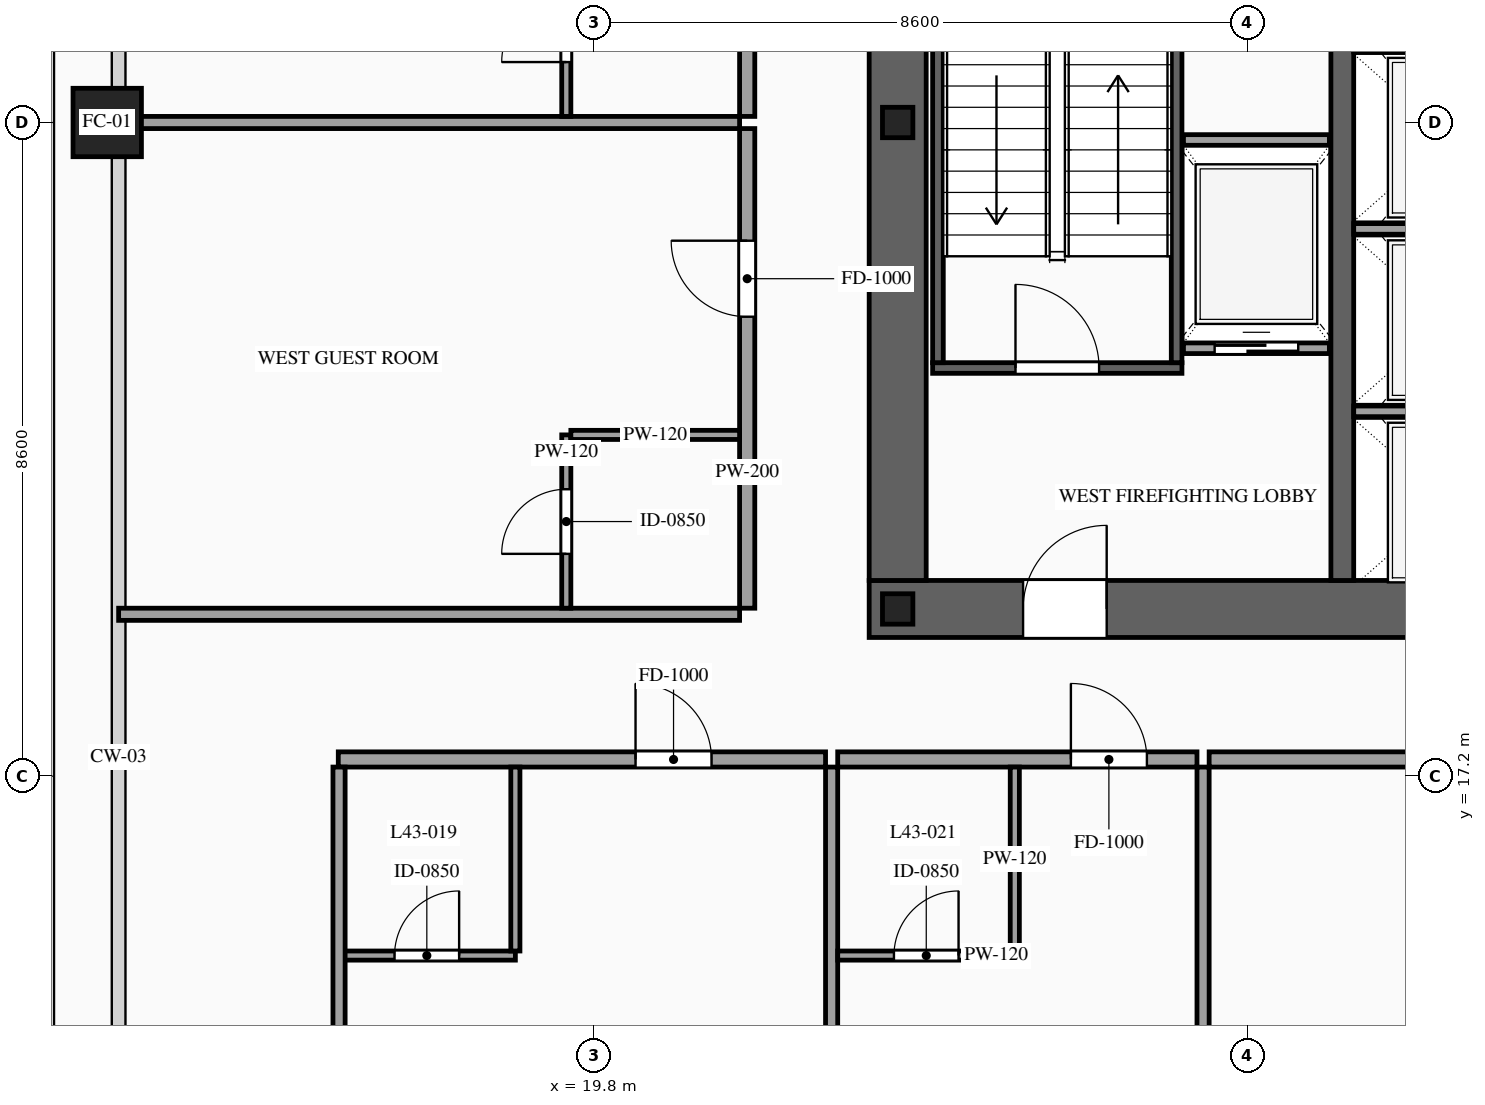
"""IFC4 building model, lengths in metres.
Left out: names, types, materials, properties, quantities, classifications, styles, units other than length and angle.
Written with IfcOpenShell. Run it as: python <this file> out.ifc"""

import sys

from ifc_helpers import new_model, si_unit, direction, frame, frame_2d, origin, origin_2d, place, context, subcontext, project, spatial, rectangle, hollow_rectangle, i_section, extrude, source, transform, mapped, element, fill, save


model = new_model("IFC4")
c1 = context("Model", 3, precision=1e-05, world=origin(), true_north=direction((0.0, 1.0)))
c2 = subcontext(c1, "Body", "Model", "MODEL_VIEW")
j1 = project(units=[si_unit("LENGTHUNIT", "METRE"), si_unit("PLANEANGLEUNIT", "RADIAN")], contexts=[c1])
p1 = place(None, origin())
s1 = spatial("IfcSite", under=j1, at=p1, CompositionType="ELEMENT")
p2 = place(p1, origin())
s2 = spatial("IfcBuilding", under=s1, at=p2, CompositionType="ELEMENT")
p3 = place(p2, frame((0.0, 0.0, 163.2)))
s3 = spatial("IfcBuildingStorey", under=s2, at=p3, CompositionType="ELEMENT", Elevation=163.2)
p4 = place(p3, frame((23.425, 19.4, 0.0), z_axis=(0.0, 0.0, 1.0), x_axis=(1.0, 0.0, 0.0)))
e1 = element("IfcWall", 1, at=p4, inside=s3, PredefinedType="SHEAR", context=c2, shape_type="SweptSolid", body=[
    extrude(rectangle(XDim=27.15, YDim=0.75, at=frame_2d((13.575, 0.0))), origin(), (0.0, 0.0, 1.0), 3.6),
])
p5 = place(p4, frame((2.025, 0.0, 0.0)))
e2 = element("IfcOpeningElement", 2, at=p5, cuts=e1, PredefinedType="OPENING", context=c2, shape_type="SweptSolid", body=[
    extrude(rectangle(XDim=1.1, YDim=2.2, at=frame_2d((0.55, 1.1))), frame((0.0, 0.39, 0.0), z_axis=(0.0, -1.0, 0.0), x_axis=(1.0, 0.0, 0.0)), (0.0, 0.0, 1.0), 0.78),
])
p6 = place(p4, frame((9.925, 0.0, 0.0)))
e3 = element("IfcOpeningElement", 3, at=p6, cuts=e1, PredefinedType="OPENING", context=c2, shape_type="SweptSolid", body=[
    extrude(rectangle(XDim=1.1, YDim=2.2, at=frame_2d((0.55, 1.1))), frame((0.0, 0.39, 0.0), z_axis=(0.0, -1.0, 0.0), x_axis=(1.0, 0.0, 0.0)), (0.0, 0.0, 1.0), 0.78),
])
p7 = place(p4, frame((23.125, 0.0, 0.0)))
e4 = element("IfcOpeningElement", 4, at=p7, cuts=e1, PredefinedType="OPENING", context=c2, shape_type="SweptSolid", body=[
    extrude(rectangle(XDim=1.1, YDim=2.2, at=frame_2d((0.55, 1.1))), frame((0.0, 0.39, 0.0), z_axis=(0.0, -1.0, 0.0), x_axis=(1.0, 0.0, 0.0)), (0.0, 0.0, 1.0), 0.78),
])
p8 = place(p4, frame((19.745, 0.0, 0.0)))
e5 = element("IfcOpeningElement", 5, at=p8, cuts=e1, PredefinedType="OPENING", context=c2, shape_type="SweptSolid", body=[
    extrude(rectangle(XDim=0.9, YDim=2.15, at=frame_2d((0.45, 1.075))), frame((0.0, 0.39, 0.0), z_axis=(0.0, -1.0, 0.0), x_axis=(1.0, 0.0, 0.0)), (0.0, 0.0, 1.0), 0.78),
])
p9 = place(p4, frame((18.305, 0.0, 0.0)))
e6 = element("IfcOpeningElement", 6, at=p9, cuts=e1, PredefinedType="OPENING", context=c2, shape_type="SweptSolid", body=[
    extrude(rectangle(XDim=0.9, YDim=2.15, at=frame_2d((0.45, 1.075))), frame((0.0, 0.39, 0.0), z_axis=(0.0, -1.0, 0.0), x_axis=(1.0, 0.0, 0.0)), (0.0, 0.0, 1.0), 0.78),
])
m1 = source(origin(), c2, "Body", "SweptSolid", [
    extrude(rectangle(XDim=12.05, YDim=0.75, at=frame_2d((6.025, 0.0))), origin(), (0.0, 0.0, 1.0), 3.6),
])
p10 = place(p3, frame((23.8, 19.775, 0.0), z_axis=(0.0, 0.0, 1.0), x_axis=(0.0, 1.0, 0.0)))
e7 = element("IfcWall", 7, at=p10, inside=s3, PredefinedType="SHEAR", context=c2, shape_type="MappedRepresentation", body=[
    mapped(m1, transform((0.0, 0.0, 0.0), scale=1.0)),
])
m2 = source(origin(), c2, "Body", "SweptSolid", [
    extrude(rectangle(XDim=12.05, YDim=0.3, at=frame_2d((6.025, 0.0))), origin(), (0.0, 0.0, 1.0), 3.6),
])
p11 = place(p3, frame((29.65, 19.775, 0.0), z_axis=(0.0, 0.0, 1.0), x_axis=(0.0, 1.0, 0.0)))
e8 = element("IfcWall", 8, at=p11, inside=s3, PredefinedType="SOLIDWALL", context=c2, shape_type="MappedRepresentation", body=[
    mapped(m2, transform((0.0, 0.0, 0.0), scale=1.0)),
])
m3 = source(origin(), c2, "Body", "SweptSolid", [
    extrude(i_section(OverallWidth=0.4, OverallDepth=0.4, WebThickness=0.013, FlangeThickness=0.021, at=origin_2d()), origin(), (0.0, 0.0, 1.0), 3.6),
])
for number, where, z_axis, x_axis in (
    (9, (23.8, 19.4, 0.0), (0.0, 0.0, 1.0), (1.0, 0.0, 0.0)),
    (10, (23.8, 25.8, 0.0), (0.0, 0.0, 1.0), (1.0, 0.0, 0.0)),
):
    element("IfcColumn", number, at=place(p3, frame(where, z_axis=z_axis, x_axis=x_axis)), inside=s3, PredefinedType="COLUMN", context=c2, shape_type="MappedRepresentation", body=[
        mapped(m3, transform((0.0, 0.0, 0.0), scale=1.0)),
    ])
m4 = source(origin(), c2, "Body", "SweptSolid", [
    extrude(hollow_rectangle(XDim=0.9, YDim=0.9, WallThickness=0.042, at=origin_2d()), origin(), (0.0, 0.0, 1.0), 3.3),
])
p12 = place(p3, frame((13.4, 25.8, 0.0), z_axis=(0.0, 0.0, 1.0), x_axis=(1.0, 0.0, 0.0)))
e11 = element("IfcColumn", 11, at=p12, inside=s3, PredefinedType="COLUMN", context=c2, shape_type="MappedRepresentation", body=[
    mapped(m4, transform((0.0, 0.0, 0.0), scale=1.0)),
])
p13 = place(p3, frame((27.56, 22.83, 0.0), z_axis=(0.0, 0.0, 1.0), x_axis=(1.0, 0.0, 0.0)))
e12 = element("IfcWall", 12, at=p13, inside=s3, PredefinedType="SOLIDWALL", context=c2, shape_type="SweptSolid", body=[
    extrude(rectangle(XDim=1.92, YDim=0.14, at=frame_2d((0.96, 0.0))), origin(), (0.0, 0.0, 1.0), 3.3),
])
p14 = place(p13, frame((0.41, 0.0, 0.0)))
e13 = element("IfcOpeningElement", 13, at=p14, cuts=e12, PredefinedType="OPENING", context=c2, shape_type="SweptSolid", body=[
    extrude(rectangle(XDim=1.1, YDim=2.2, at=frame_2d((0.55, 1.1))), frame((0.0, 0.085, 0.0), z_axis=(0.0, -1.0, 0.0), x_axis=(1.0, 0.0, 0.0)), (0.0, 0.0, 1.0), 0.17),
])
m5 = source(origin(), c2, "Body", "SweptSolid", [
    extrude(rectangle(XDim=1.92, YDim=0.14, at=frame_2d((0.96, 0.0))), origin(), (0.0, 0.0, 1.0), 3.3),
])
p15 = place(p3, frame((27.56, 25.57, 0.0), z_axis=(0.0, 0.0, 1.0), x_axis=(1.0, 0.0, 0.0)))
e14 = element("IfcWall", 14, at=p15, inside=s3, PredefinedType="SOLIDWALL", context=c2, shape_type="MappedRepresentation", body=[
    mapped(m5, transform((0.0, 0.0, 0.0), scale=1.0)),
])
m6 = source(origin(), c2, "Body", "SweptSolid", [
    extrude(rectangle(XDim=2.5, YDim=0.14, at=frame_2d((1.25, 0.0))), origin(), (0.0, 0.0, 1.0), 3.3),
])
for number, where, z_axis, x_axis in (
    (15, (29.8, 22.0, 0.0), (0.0, 0.0, 1.0), (1.0, 0.0, 0.0)),
    (16, (29.8, 24.4, 0.0), (0.0, 0.0, 1.0), (1.0, 0.0, 0.0)),
):
    element("IfcWall", number, at=place(p3, frame(where, z_axis=z_axis, x_axis=x_axis)), inside=s3, PredefinedType="SOLIDWALL", context=c2, shape_type="MappedRepresentation", body=[
        mapped(m6, transform((0.0, 0.0, 0.0), scale=1.0)),
    ])
p16 = place(p3, frame((24.26, 22.57, 0.0), z_axis=(0.0, 0.0, 1.0), x_axis=(1.0, 0.0, 0.0)))
e17 = element("IfcWall", 17, at=p16, inside=s3, PredefinedType="SOLIDWALL", context=c2, shape_type="SweptSolid", body=[
    extrude(rectangle(XDim=3.28, YDim=0.14, at=frame_2d((1.64, 0.0))), origin(), (0.0, 0.0, 1.0), 3.3),
])
p17 = place(p16, frame((1.09, 0.0, 0.0)))
e18 = element("IfcOpeningElement", 18, at=p17, cuts=e17, PredefinedType="OPENING", context=c2, shape_type="SweptSolid", body=[
    extrude(rectangle(XDim=1.1, YDim=2.2, at=frame_2d((0.55, 1.1))), frame((0.0, 0.085, 0.0), z_axis=(0.0, -1.0, 0.0), x_axis=(1.0, 0.0, 0.0)), (0.0, 0.0, 1.0), 0.17),
])
m7 = source(origin(), c2, "Body", "SweptSolid", [
    extrude(rectangle(XDim=8.94, YDim=0.14, at=frame_2d((4.47, 0.0))), origin(), (0.0, 0.0, 1.0), 3.3),
])
for number, where, z_axis, x_axis in (
    (19, (24.33, 22.64, 0.0), (0.0, 0.0, 1.0), (0.0, 1.0, 0.0)),
    (20, (27.47, 22.64, 0.0), (0.0, 0.0, 1.0), (0.0, 1.0, 0.0)),
):
    element("IfcWall", number, at=place(p3, frame(where, z_axis=z_axis, x_axis=x_axis)), inside=s3, PredefinedType="SOLIDWALL", context=c2, shape_type="MappedRepresentation", body=[
        mapped(m7, transform((0.0, 0.0, 0.0), scale=1.0)),
    ])
p18 = place(p3, frame((16.44, 17.42, 0.0), z_axis=(0.0, 0.0, 1.0), x_axis=(1.0, 0.0, 0.0)))
e21 = element("IfcWall", 21, at=p18, inside=s3, PredefinedType="PARTITIONING", context=c2, shape_type="SweptSolid", body=[
    extrude(rectangle(XDim=6.411, YDim=0.2, at=frame_2d((3.206, 0.0))), origin(), (0.0, 0.0, 1.0), 3.05),
])
p19 = place(p18, frame((3.911, 0.0, 0.0)))
e22 = element("IfcOpeningElement", 22, at=p19, cuts=e21, PredefinedType="OPENING", context=c2, shape_type="SweptSolid", body=[
    extrude(rectangle(XDim=1.0, YDim=2.2, at=frame_2d((0.5, 1.1))), frame((0.0, 0.115, 0.0), z_axis=(0.0, -1.0, 0.0), x_axis=(1.0, 0.0, 0.0)), (0.0, 0.0, 1.0), 0.23),
])
m8 = source(origin(), c2, "Body", "SweptSolid", [
    extrude(rectangle(XDim=14.97, YDim=0.16, at=frame_2d((7.485, 0.0))), origin(), (0.0, 0.0, 1.0), 3.05),
])
p20 = place(p3, frame((22.931, 2.35, 0.0), z_axis=(0.0, 0.0, 1.0), x_axis=(0.0, 1.0, 0.0)))
e23 = element("IfcWall", 23, at=p20, inside=s3, PredefinedType="PARTITIONING", context=c2, shape_type="MappedRepresentation", body=[
    mapped(m8, transform((0.0, 0.0, 0.0), scale=1.0)),
])
p21 = place(p3, frame((16.44, 14.84, 0.0), z_axis=(0.0, 0.0, 1.0), x_axis=(1.0, 0.0, 0.0)))
e24 = element("IfcWall", 24, at=p21, inside=s3, PredefinedType="PARTITIONING", context=c2, shape_type="SweptSolid", body=[
    extrude(rectangle(XDim=2.33, YDim=0.12, at=frame_2d((1.165, 0.0))), origin(), (0.0, 0.0, 1.0), 3.05),
])
p22 = place(p21, frame((0.74, 0.0, 0.0)))
e25 = element("IfcOpeningElement", 25, at=p22, cuts=e24, PredefinedType="OPENING", context=c2, shape_type="SweptSolid", body=[
    extrude(rectangle(XDim=0.85, YDim=2.1, at=frame_2d((0.425, 1.05))), frame((0.0, 0.075, 0.0), z_axis=(0.0, -1.0, 0.0), x_axis=(1.0, 0.0, 0.0)), (0.0, 0.0, 1.0), 0.15),
])
m9 = source(origin(), c2, "Body", "SweptSolid", [
    extrude(rectangle(XDim=2.42, YDim=0.12, at=frame_2d((1.21, 0.0))), origin(), (0.0, 0.0, 1.0), 3.05),
])
p23 = place(p3, frame((18.77, 14.9, 0.0), z_axis=(0.0, 0.0, 1.0), x_axis=(0.0, 1.0, 0.0)))
e26 = element("IfcWall", 26, at=p23, inside=s3, PredefinedType="PARTITIONING", context=c2, shape_type="MappedRepresentation", body=[
    mapped(m9, transform((0.0, 0.0, 0.0), scale=1.0)),
])
p24 = place(p3, frame((23.011, 17.42, 0.0), z_axis=(0.0, 0.0, 1.0), x_axis=(1.0, 0.0, 0.0)))
e27 = element("IfcWall", 27, at=p24, inside=s3, PredefinedType="PARTITIONING", context=c2, shape_type="SweptSolid", body=[
    extrude(rectangle(XDim=4.727, YDim=0.2, at=frame_2d((2.364, 0.0))), origin(), (0.0, 0.0, 1.0), 3.05),
])
p25 = place(p24, frame((3.068, 0.0, 0.0)))
e28 = element("IfcOpeningElement", 28, at=p25, cuts=e27, PredefinedType="OPENING", context=c2, shape_type="SweptSolid", body=[
    extrude(rectangle(XDim=1.0, YDim=2.2, at=frame_2d((0.5, 1.1))), frame((0.0, 0.115, 0.0), z_axis=(0.0, -1.0, 0.0), x_axis=(1.0, 0.0, 0.0)), (0.0, 0.0, 1.0), 0.23),
])
p26 = place(p3, frame((27.818, 2.35, 0.0), z_axis=(0.0, 0.0, 1.0), x_axis=(0.0, 1.0, 0.0)))
e29 = element("IfcWall", 29, at=p26, inside=s3, PredefinedType="PARTITIONING", context=c2, shape_type="MappedRepresentation", body=[
    mapped(m8, transform((0.0, 0.0, 0.0), scale=1.0)),
])
p27 = place(p3, frame((23.011, 14.84, 0.0), z_axis=(0.0, 0.0, 1.0), x_axis=(1.0, 0.0, 0.0)))
e30 = element("IfcWall", 30, at=p27, inside=s3, PredefinedType="PARTITIONING", context=c2, shape_type="SweptSolid", body=[
    extrude(rectangle(XDim=2.33, YDim=0.12, at=frame_2d((1.165, 0.0))), origin(), (0.0, 0.0, 1.0), 3.05),
])
p28 = place(p27, frame((0.74, 0.0, 0.0)))
e31 = element("IfcOpeningElement", 31, at=p28, cuts=e30, PredefinedType="OPENING", context=c2, shape_type="SweptSolid", body=[
    extrude(rectangle(XDim=0.85, YDim=2.1, at=frame_2d((0.425, 1.05))), frame((0.0, 0.075, 0.0), z_axis=(0.0, -1.0, 0.0), x_axis=(1.0, 0.0, 0.0)), (0.0, 0.0, 1.0), 0.15),
])
p29 = place(p3, frame((25.341, 14.9, 0.0), z_axis=(0.0, 0.0, 1.0), x_axis=(0.0, 1.0, 0.0)))
e32 = element("IfcWall", 32, at=p29, inside=s3, PredefinedType="PARTITIONING", context=c2, shape_type="MappedRepresentation", body=[
    mapped(m9, transform((0.0, 0.0, 0.0), scale=1.0)),
])
p30 = place(p3, frame((27.898, 17.42, 0.0), z_axis=(0.0, 0.0, 1.0), x_axis=(1.0, 0.0, 0.0)))
e33 = element("IfcWall", 33, at=p30, inside=s3, PredefinedType="PARTITIONING", context=c2, shape_type="SweptSolid", body=[
    extrude(rectangle(XDim=6.702, YDim=0.2, at=frame_2d((3.351, 0.0))), origin(), (0.0, 0.0, 1.0), 3.05),
])
p31 = place(p30, frame((2.851, 0.0, 0.0)))
e34 = element("IfcOpeningElement", 34, at=p31, cuts=e33, PredefinedType="OPENING", context=c2, shape_type="SweptSolid", body=[
    extrude(rectangle(XDim=1.0, YDim=2.2, at=frame_2d((0.5, 1.1))), frame((0.0, 0.115, 0.0), z_axis=(0.0, -1.0, 0.0), x_axis=(1.0, 0.0, 0.0)), (0.0, 0.0, 1.0), 0.23),
])
m10 = source(origin(), c2, "Body", "SweptSolid", [
    extrude(rectangle(XDim=14.82, YDim=0.16, at=frame_2d((7.41, 0.0))), origin(), (0.0, 0.0, 1.0), 3.05),
])
p32 = place(p3, frame((16.45, 2.5, 0.0), z_axis=(0.0, 0.0, 1.0), x_axis=(0.0, 1.0, 0.0)))
e35 = element("IfcWall", 35, at=p32, inside=s3, PredefinedType="PARTITIONING", context=c2, shape_type="MappedRepresentation", body=[
    mapped(m10, transform((0.0, 0.0, 0.0), scale=1.0)),
])
p33 = place(p3, frame((21.82, 19.41, 0.0), z_axis=(0.0, 0.0, 1.0), x_axis=(0.0, 1.0, 0.0)))
e36 = element("IfcWall", 36, at=p33, inside=s3, PredefinedType="PARTITIONING", context=c2, shape_type="SweptSolid", body=[
    extrude(rectangle(XDim=6.31, YDim=0.2, at=frame_2d((3.155, 0.0))), origin(), (0.0, 0.0, 1.0), 3.3),
])
p34 = place(p33, frame((3.835, 0.0, 0.0)))
e37 = element("IfcOpeningElement", 37, at=p34, cuts=e36, PredefinedType="OPENING", context=c2, shape_type="SweptSolid", body=[
    extrude(rectangle(XDim=1.0, YDim=2.2, at=frame_2d((0.5, 1.1))), frame((0.0, 0.115, 0.0), z_axis=(0.0, -1.0, 0.0), x_axis=(1.0, 0.0, 0.0)), (0.0, 0.0, 1.0), 0.23),
])
m11 = source(origin(), c2, "Body", "SweptSolid", [
    extrude(rectangle(XDim=8.17, YDim=0.16, at=frame_2d((4.085, 0.0))), origin(), (0.0, 0.0, 1.0), 1.695),
])
p35 = place(p3, frame((13.55, 25.8, 0.0), z_axis=(0.0, 0.0, 1.0), x_axis=(1.0, 0.0, 0.0)))
e38 = element("IfcWall", 38, at=p35, inside=s3, PredefinedType="PARTITIONING", context=c2, shape_type="MappedRepresentation", body=[
    mapped(m11, transform((0.0, 0.0, 0.0), scale=1.0)),
])
m12 = source(origin(), c2, "Body", "SweptSolid", [
    extrude(rectangle(XDim=8.17, YDim=0.16, at=frame_2d((4.085, 0.0))), origin(), (0.0, 0.0, 1.0), 3.3),
])
p36 = place(p3, frame((13.55, 19.33, 0.0), z_axis=(0.0, 0.0, 1.0), x_axis=(1.0, 0.0, 0.0)))
e39 = element("IfcWall", 39, at=p36, inside=s3, PredefinedType="PARTITIONING", context=c2, shape_type="MappedRepresentation", body=[
    mapped(m12, transform((0.0, 0.0, 0.0), scale=1.0)),
])
p37 = place(p3, frame((19.44, 19.41, 0.0), z_axis=(0.0, 0.0, 1.0), x_axis=(0.0, 1.0, 0.0)))
e40 = element("IfcWall", 40, at=p37, inside=s3, PredefinedType="PARTITIONING", context=c2, shape_type="SweptSolid", body=[
    extrude(rectangle(XDim=2.28, YDim=0.12, at=frame_2d((1.14, 0.0))), origin(), (0.0, 0.0, 1.0), 3.3),
])
p38 = place(p37, frame((0.715, 0.0, 0.0)))
e41 = element("IfcOpeningElement", 41, at=p38, cuts=e40, PredefinedType="OPENING", context=c2, shape_type="SweptSolid", body=[
    extrude(rectangle(XDim=0.85, YDim=2.1, at=frame_2d((0.425, 1.05))), frame((0.0, 0.075, 0.0), z_axis=(0.0, -1.0, 0.0), x_axis=(1.0, 0.0, 0.0)), (0.0, 0.0, 1.0), 0.15),
])
m13 = source(origin(), c2, "Body", "SweptSolid", [
    extrude(rectangle(XDim=2.22, YDim=0.12, at=frame_2d((1.11, 0.0))), origin(), (0.0, 0.0, 1.0), 3.3),
])
p39 = place(p3, frame((19.5, 21.69, 0.0), z_axis=(0.0, 0.0, 1.0), x_axis=(1.0, 0.0, 0.0)))
e42 = element("IfcWall", 42, at=p39, inside=s3, PredefinedType="PARTITIONING", context=c2, shape_type="MappedRepresentation", body=[
    mapped(m13, transform((0.0, 0.0, 0.0), scale=1.0)),
])
p40 = place(p3, frame((21.82, 25.88, 0.0), z_axis=(0.0, 0.0, 1.0), x_axis=(0.0, 1.0, 0.0)))
e43 = element("IfcWall", 43, at=p40, inside=s3, PredefinedType="PARTITIONING", context=c2, shape_type="SweptSolid", body=[
    extrude(rectangle(XDim=6.31, YDim=0.2, at=frame_2d((3.155, 0.0))), origin(), (0.0, 0.0, 1.0), 3.3),
])
p41 = place(p40, frame((3.835, 0.0, 0.0)))
e44 = element("IfcOpeningElement", 44, at=p41, cuts=e43, PredefinedType="OPENING", context=c2, shape_type="SweptSolid", body=[
    extrude(rectangle(XDim=1.0, YDim=2.2, at=frame_2d((0.5, 1.1))), frame((0.0, 0.115, 0.0), z_axis=(0.0, -1.0, 0.0), x_axis=(1.0, 0.0, 0.0)), (0.0, 0.0, 1.0), 0.23),
])
p42 = place(p3, frame((19.44, 25.88, 0.0), z_axis=(0.0, 0.0, 1.0), x_axis=(0.0, 1.0, 0.0)))
e45 = element("IfcWall", 45, at=p42, inside=s3, PredefinedType="PARTITIONING", context=c2, shape_type="SweptSolid", body=[
    extrude(rectangle(XDim=2.28, YDim=0.12, at=frame_2d((1.14, 0.0))), origin(), (0.0, 0.0, 1.0), 3.3),
])
p43 = place(p42, frame((0.715, 0.0, 0.0)))
e46 = element("IfcOpeningElement", 46, at=p43, cuts=e45, PredefinedType="OPENING", context=c2, shape_type="SweptSolid", body=[
    extrude(rectangle(XDim=0.85, YDim=2.1, at=frame_2d((0.425, 1.05))), frame((0.0, 0.075, 0.0), z_axis=(0.0, -1.0, 0.0), x_axis=(1.0, 0.0, 0.0)), (0.0, 0.0, 1.0), 0.15),
])
m14 = source(origin(), c2, "Body", "SweptSolid", [
    extrude(rectangle(XDim=1.1, YDim=2.2, at=frame_2d((0.55, 1.1))), frame((0.0, 0.025, 0.0), z_axis=(0.0, -1.0, 0.0), x_axis=(1.0, 0.0, 0.0)), (0.0, 0.0, 1.0), 0.05),
])
p44 = place(p14, origin())
e47 = element("IfcDoor", 47, at=p44, inside=s3, OperationType="SLIDING_TO_LEFT", PredefinedType="DOOR", context=c2, shape_type="MappedRepresentation", body=[
    mapped(m14, transform((0.0, 0.0, 0.0), scale=1.0)),
])
fill(e13, e47)
m15 = source(origin(), c2, "Body", "SweptSolid", [
    extrude(rectangle(XDim=1.1, YDim=2.2, at=frame_2d((0.55, 1.1))), frame((0.0, 0.025, 0.0), z_axis=(0.0, -1.0, 0.0), x_axis=(1.0, 0.0, 0.0)), (0.0, 0.0, 1.0), 0.05),
])
p45 = place(p17, origin())
e48 = element("IfcDoor", 48, at=p45, inside=s3, OperationType="SINGLE_SWING_LEFT", PredefinedType="DOOR", context=c2, shape_type="MappedRepresentation", body=[
    mapped(m15, transform((0.0, 0.0, 0.0), scale=1.0)),
])
fill(e18, e48)
p46 = place(p5, origin())
e49 = element("IfcDoor", 49, at=p46, inside=s3, OperationType="SINGLE_SWING_RIGHT", PredefinedType="DOOR", context=c2, shape_type="MappedRepresentation", body=[
    mapped(m15, transform((0.0, 0.0, 0.0), scale=1.0)),
])
fill(e2, e49)
m16 = source(origin(), c2, "Body", "SweptSolid", [
    extrude(rectangle(XDim=1.0, YDim=2.2, at=frame_2d((0.5, 1.1))), frame((0.0, 0.025, 0.0), z_axis=(0.0, -1.0, 0.0), x_axis=(1.0, 0.0, 0.0)), (0.0, 0.0, 1.0), 0.05),
])
p47 = place(p19, origin())
e50 = element("IfcDoor", 50, at=p47, inside=s3, OperationType="SINGLE_SWING_LEFT", PredefinedType="DOOR", context=c2, shape_type="MappedRepresentation", body=[
    mapped(m16, transform((0.0, 0.0, 0.0), scale=1.0)),
])
fill(e22, e50)
m17 = source(origin(), c2, "Body", "SweptSolid", [
    extrude(rectangle(XDim=0.85, YDim=2.1, at=frame_2d((0.425, 1.05))), frame((0.0, 0.025, 0.0), z_axis=(0.0, -1.0, 0.0), x_axis=(1.0, 0.0, 0.0)), (0.0, 0.0, 1.0), 0.05),
])
p48 = place(p22, origin())
e51 = element("IfcDoor", 51, at=p48, inside=s3, OperationType="SINGLE_SWING_RIGHT", PredefinedType="DOOR", context=c2, shape_type="MappedRepresentation", body=[
    mapped(m17, transform((0.0, 0.0, 0.0), scale=1.0)),
])
fill(e25, e51)
p49 = place(p25, origin())
e52 = element("IfcDoor", 52, at=p49, inside=s3, OperationType="SINGLE_SWING_LEFT", PredefinedType="DOOR", context=c2, shape_type="MappedRepresentation", body=[
    mapped(m16, transform((0.0, 0.0, 0.0), scale=1.0)),
])
fill(e28, e52)
p50 = place(p28, origin())
e53 = element("IfcDoor", 53, at=p50, inside=s3, OperationType="SINGLE_SWING_RIGHT", PredefinedType="DOOR", context=c2, shape_type="MappedRepresentation", body=[
    mapped(m17, transform((0.0, 0.0, 0.0), scale=1.0)),
])
fill(e31, e53)
p51 = place(p34, origin())
e54 = element("IfcDoor", 54, at=p51, inside=s3, OperationType="SINGLE_SWING_RIGHT", PredefinedType="DOOR", context=c2, shape_type="MappedRepresentation", body=[
    mapped(m16, transform((0.0, 0.0, 0.0), scale=1.0)),
])
fill(e37, e54)
p52 = place(p38, origin())
e55 = element("IfcDoor", 55, at=p52, inside=s3, OperationType="SINGLE_SWING_LEFT", PredefinedType="DOOR", context=c2, shape_type="MappedRepresentation", body=[
    mapped(m17, transform((0.0, 0.0, 0.0), scale=1.0)),
])
fill(e41, e55)
p53 = place(p43, origin())
e56 = element("IfcDoor", 56, at=p53, inside=s3, OperationType="SINGLE_SWING_LEFT", PredefinedType="DOOR", context=c2, shape_type="MappedRepresentation", body=[
    mapped(m17, transform((0.0, 0.0, 0.0), scale=1.0)),
])
fill(e46, e56)
save(model, sys.argv[1])
